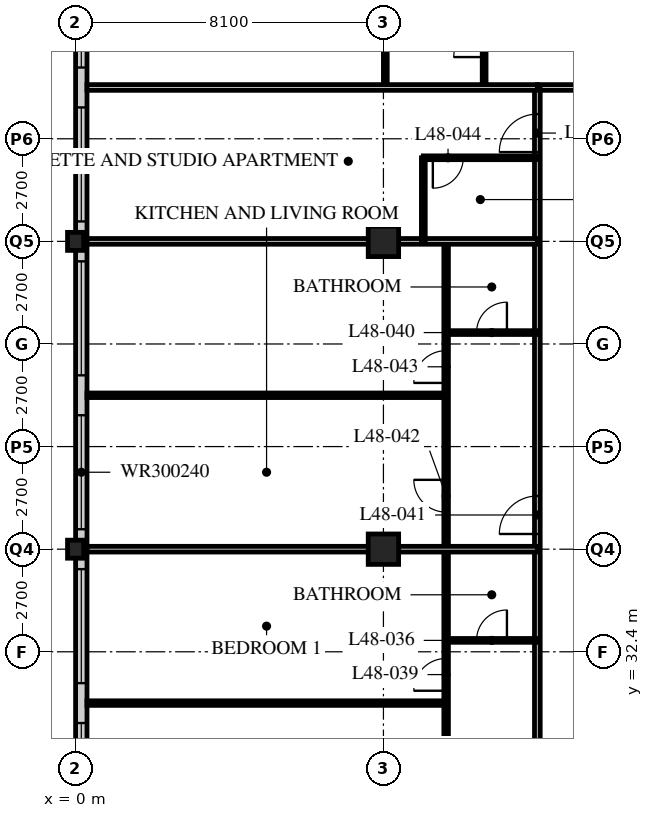
"""IFC4 building model, lengths in metres.
Left out: names, types, materials, properties, quantities, classifications, styles, units other than length and angle.
Written with IfcOpenShell. Run it as: python <this file> out.ifc"""

import sys

from ifc_helpers import new_model, si_unit, direction, frame, frame_2d, origin, origin_2d, place, context, subcontext, project, spatial, rectangle, hollow_rectangle, i_section, extrude, element, fill, save


model = new_model("IFC4")
c1 = context("Model", 3, precision=1e-05, world=origin(), true_north=direction((0.0, 1.0)))
c2 = subcontext(c1, "Body", "Model", "MODEL_VIEW")
j1 = project(units=[si_unit("LENGTHUNIT", "METRE"), si_unit("PLANEANGLEUNIT", "RADIAN")], contexts=[c1])
p1 = place(None, origin())
s1 = spatial("IfcSite", under=j1, at=p1, CompositionType="ELEMENT")
p2 = place(p1, origin())
s2 = spatial("IfcBuilding", under=s1, at=p2, CompositionType="ELEMENT")
p3 = place(p2, frame((0.0, 0.0, 188.4)))
s3 = spatial("IfcBuildingStorey", under=s2, at=p3, CompositionType="ELEMENT", Elevation=188.4)
for number, where, z_axis, x_axis in (
    (1, (0.0, 35.1, 0.0), (0.0, 0.0, 1.0), (1.0, 0.0, 0.0)),
    (2, (0.0, 43.2, 0.0), (0.0, 0.0, 1.0), (1.0, 0.0, 0.0)),
):
    element("IfcColumn", number, at=place(p3, frame(where, z_axis=z_axis, x_axis=x_axis)), inside=s3, PredefinedType="COLUMN", context=c2, shape_type="SweptSolid", body=[
        extrude(i_section(OverallWidth=0.424, OverallDepth=0.475, WebThickness=0.048, FlangeThickness=0.077, FilletRadius=0.015, at=origin_2d()), origin(), (0.0, 0.0, 1.0), 3.6),
    ])
for number, where, z_axis, x_axis in (
    (3, (8.1, 35.1, 0.0), (0.0, 0.0, 1.0), (1.0, 0.0, 0.0)),
    (4, (8.1, 43.2, 0.0), (0.0, 0.0, 1.0), (1.0, 0.0, 0.0)),
):
    element("IfcColumn", number, at=place(p3, frame(where, z_axis=z_axis, x_axis=x_axis)), inside=s3, PredefinedType="COLUMN", context=c2, shape_type="SweptSolid", body=[
        extrude(hollow_rectangle(XDim=0.8, YDim=0.8, WallThickness=0.08, at=origin_2d()), origin(), (0.0, 0.0, 1.0), 3.6),
    ])
p4 = place(p3, frame((0.15, 51.0, 0.0), z_axis=(0.0, 0.0, 1.0), x_axis=(0.0, -1.0, 0.0)))
e5 = element("IfcWall", 5, at=p4, inside=s3, PredefinedType="SOLIDWALL", context=c2, shape_type="SweptSolid", body=[
    extrude(rectangle(XDim=32.1, YDim=0.3, at=frame_2d((16.05, 0.0))), origin(), (0.0, 0.0, 1.0), 3.39),
])
p5 = place(p4, frame((0.225, 0.0, 0.6)))
e6 = element("IfcOpeningElement", 6, at=p5, cuts=e5, PredefinedType="OPENING", context=c2, shape_type="SweptSolid", body=[
    extrude(rectangle(XDim=3.0, YDim=2.4, at=frame_2d((1.5, 1.2))), frame((0.0, 0.16, 0.0), z_axis=(0.0, -1.0, 0.0), x_axis=(1.0, 0.0, 0.0)), (0.0, 0.0, 1.0), 0.32),
])
p6 = place(p4, frame((4.275, 0.0, 0.6)))
e7 = element("IfcOpeningElement", 7, at=p6, cuts=e5, PredefinedType="OPENING", context=c2, shape_type="SweptSolid", body=[
    extrude(rectangle(XDim=3.0, YDim=2.4, at=frame_2d((1.5, 1.2))), frame((0.0, 0.16, 0.0), z_axis=(0.0, -1.0, 0.0), x_axis=(1.0, 0.0, 0.0)), (0.0, 0.0, 1.0), 0.32),
])
p7 = place(p4, frame((8.325, 0.0, 0.6)))
e8 = element("IfcOpeningElement", 8, at=p7, cuts=e5, PredefinedType="OPENING", context=c2, shape_type="SweptSolid", body=[
    extrude(rectangle(XDim=3.0, YDim=2.4, at=frame_2d((1.5, 1.2))), frame((0.0, 0.16, 0.0), z_axis=(0.0, -1.0, 0.0), x_axis=(1.0, 0.0, 0.0)), (0.0, 0.0, 1.0), 0.32),
])
p8 = place(p4, frame((12.375, 0.0, 0.6)))
e9 = element("IfcOpeningElement", 9, at=p8, cuts=e5, PredefinedType="OPENING", context=c2, shape_type="SweptSolid", body=[
    extrude(rectangle(XDim=3.0, YDim=2.4, at=frame_2d((1.5, 1.2))), frame((0.0, 0.16, 0.0), z_axis=(0.0, -1.0, 0.0), x_axis=(1.0, 0.0, 0.0)), (0.0, 0.0, 1.0), 0.32),
])
p9 = place(p4, frame((16.425, 0.0, 0.6)))
e10 = element("IfcOpeningElement", 10, at=p9, cuts=e5, PredefinedType="OPENING", context=c2, shape_type="SweptSolid", body=[
    extrude(rectangle(XDim=3.0, YDim=2.4, at=frame_2d((1.5, 1.2))), frame((0.0, 0.16, 0.0), z_axis=(0.0, -1.0, 0.0), x_axis=(1.0, 0.0, 0.0)), (0.0, 0.0, 1.0), 0.32),
])
p10 = place(p4, frame((20.475, 0.0, 0.6)))
e11 = element("IfcOpeningElement", 11, at=p10, cuts=e5, PredefinedType="OPENING", context=c2, shape_type="SweptSolid", body=[
    extrude(rectangle(XDim=3.0, YDim=2.4, at=frame_2d((1.5, 1.2))), frame((0.0, 0.16, 0.0), z_axis=(0.0, -1.0, 0.0), x_axis=(1.0, 0.0, 0.0)), (0.0, 0.0, 1.0), 0.32),
])
p11 = place(p4, frame((24.525, 0.0, 0.6)))
e12 = element("IfcOpeningElement", 12, at=p11, cuts=e5, PredefinedType="OPENING", context=c2, shape_type="SweptSolid", body=[
    extrude(rectangle(XDim=3.0, YDim=2.4, at=frame_2d((1.5, 1.2))), frame((0.0, 0.16, 0.0), z_axis=(0.0, -1.0, 0.0), x_axis=(1.0, 0.0, 0.0)), (0.0, 0.0, 1.0), 0.32),
])
p12 = place(p4, frame((28.575, 0.0, 0.6)))
e13 = element("IfcOpeningElement", 13, at=p12, cuts=e5, PredefinedType="OPENING", context=c2, shape_type="SweptSolid", body=[
    extrude(rectangle(XDim=3.0, YDim=2.4, at=frame_2d((1.5, 1.2))), frame((0.0, 0.16, 0.0), z_axis=(0.0, -1.0, 0.0), x_axis=(1.0, 0.0, 0.0)), (0.0, 0.0, 1.0), 0.32),
])
p13 = place(p3, frame((12.15, 47.25, 0.0), z_axis=(0.0, 0.0, 1.0), x_axis=(1.0, 0.0, 0.0)))
e14 = element("IfcWall", 14, at=p13, inside=s3, PredefinedType="PARTITIONING", context=c2, shape_type="SweptSolid", body=[
    extrude(rectangle(XDim=32.4, YDim=0.15, at=frame_2d((16.2, 0.0))), origin(), (0.0, 0.0, 1.0), 3.39),
])
p14 = place(p13, frame((4.45, 0.0, 0.0)))
e15 = element("IfcOpeningElement", 15, at=p14, cuts=e14, PredefinedType="OPENING", context=c2, shape_type="SweptSolid", body=[
    extrude(rectangle(XDim=1.0, YDim=2.1, at=frame_2d((0.5, 1.05))), frame((0.0, 0.085, 0.0), z_axis=(0.0, -1.0, 0.0), x_axis=(1.0, 0.0, 0.0)), (0.0, 0.0, 1.0), 0.17),
])
p15 = place(p13, frame((16.6, 0.0, 0.0)))
e16 = element("IfcOpeningElement", 16, at=p15, cuts=e14, PredefinedType="OPENING", context=c2, shape_type="SweptSolid", body=[
    extrude(rectangle(XDim=1.0, YDim=2.1, at=frame_2d((0.5, 1.05))), frame((0.0, 0.085, 0.0), z_axis=(0.0, -1.0, 0.0), x_axis=(1.0, 0.0, 0.0)), (0.0, 0.0, 1.0), 0.17),
])
p16 = place(p13, frame((29.875, 0.0, 0.0)))
e17 = element("IfcOpeningElement", 17, at=p16, cuts=e14, PredefinedType="OPENING", context=c2, shape_type="SweptSolid", body=[
    extrude(rectangle(XDim=1.0, YDim=2.1, at=frame_2d((0.5, 1.05))), frame((0.0, 0.085, 0.0), z_axis=(0.0, -1.0, 0.0), x_axis=(1.0, 0.0, 0.0)), (0.0, 0.0, 1.0), 0.17),
])
p17 = place(p13, frame((1.525, 0.0, 0.0)))
e18 = element("IfcOpeningElement", 18, at=p17, cuts=e14, PredefinedType="OPENING", context=c2, shape_type="SweptSolid", body=[
    extrude(rectangle(XDim=1.0, YDim=2.1, at=frame_2d((0.5, 1.05))), frame((0.0, 0.085, 0.0), z_axis=(0.0, -1.0, 0.0), x_axis=(1.0, 0.0, 0.0)), (0.0, 0.0, 1.0), 0.17),
])
p18 = place(p3, frame((12.15, 18.9, 0.0), z_axis=(0.0, 0.0, 1.0), x_axis=(0.0, 1.0, 0.0)))
e19 = element("IfcWall", 19, at=p18, inside=s3, PredefinedType="PARTITIONING", context=c2, shape_type="SweptSolid", body=[
    extrude(rectangle(XDim=28.35, YDim=0.15, at=frame_2d((14.175, 0.0))), origin(), (0.0, 0.0, 1.0), 3.39),
])
p19 = place(p18, frame((2.35, 0.0, 0.0)))
e20 = element("IfcOpeningElement", 20, at=p19, cuts=e19, PredefinedType="OPENING", context=c2, shape_type="SweptSolid", body=[
    extrude(rectangle(XDim=1.0, YDim=2.1, at=frame_2d((0.5, 1.05))), frame((0.0, 0.085, 0.0), z_axis=(0.0, -1.0, 0.0), x_axis=(1.0, 0.0, 0.0)), (0.0, 0.0, 1.0), 0.17),
])
p20 = place(p18, frame((6.4, 0.0, 0.0)))
e21 = element("IfcOpeningElement", 21, at=p20, cuts=e19, PredefinedType="OPENING", context=c2, shape_type="SweptSolid", body=[
    extrude(rectangle(XDim=1.0, YDim=2.1, at=frame_2d((0.5, 1.05))), frame((0.0, 0.085, 0.0), z_axis=(0.0, -1.0, 0.0), x_axis=(1.0, 0.0, 0.0)), (0.0, 0.0, 1.0), 0.17),
])
p21 = place(p18, frame((8.5, 0.0, 0.0)))
e22 = element("IfcOpeningElement", 22, at=p21, cuts=e19, PredefinedType="OPENING", context=c2, shape_type="SweptSolid", body=[
    extrude(rectangle(XDim=1.0, YDim=2.1, at=frame_2d((0.5, 1.05))), frame((0.0, 0.085, 0.0), z_axis=(0.0, -1.0, 0.0), x_axis=(1.0, 0.0, 0.0)), (0.0, 0.0, 1.0), 0.17),
])
p22 = place(p18, frame((16.6, 0.0, 0.0)))
e23 = element("IfcOpeningElement", 23, at=p22, cuts=e19, PredefinedType="OPENING", context=c2, shape_type="SweptSolid", body=[
    extrude(rectangle(XDim=1.0, YDim=2.1, at=frame_2d((0.5, 1.05))), frame((0.0, 0.085, 0.0), z_axis=(0.0, -1.0, 0.0), x_axis=(1.0, 0.0, 0.0)), (0.0, 0.0, 1.0), 0.17),
])
p23 = place(p18, frame((26.65, 0.0, 0.0)))
e24 = element("IfcOpeningElement", 24, at=p23, cuts=e19, PredefinedType="OPENING", context=c2, shape_type="SweptSolid", body=[
    extrude(rectangle(XDim=1.0, YDim=2.1, at=frame_2d((0.5, 1.05))), frame((0.0, 0.085, 0.0), z_axis=(0.0, -1.0, 0.0), x_axis=(1.0, 0.0, 0.0)), (0.0, 0.0, 1.0), 0.17),
])
p24 = place(p3, frame((9.75, 27.0, 0.0), z_axis=(0.0, 0.0, 1.0), x_axis=(0.0, 1.0, 0.0)))
e25 = element("IfcWall", 25, at=p24, inside=s3, PredefinedType="PARTITIONING", context=c2, shape_type="SweptSolid", body=[
    extrude(rectangle(XDim=16.2, YDim=0.12, at=frame_2d((8.1, 0.0))), origin(), (0.0, 0.0, 1.0), 3.39),
])
p25 = place(p24, frame((0.975, 0.0, 0.0)))
e26 = element("IfcOpeningElement", 26, at=p25, cuts=e25, PredefinedType="OPENING", context=c2, shape_type="SweptSolid", body=[
    extrude(rectangle(XDim=0.85, YDim=2.1, at=frame_2d((0.425, 1.05))), frame((0.0, 0.07, 0.0), z_axis=(0.0, -1.0, 0.0), x_axis=(1.0, 0.0, 0.0)), (0.0, 0.0, 1.0), 0.14),
])
p26 = place(p24, frame((4.375, 0.0, 0.0)))
e27 = element("IfcOpeningElement", 27, at=p26, cuts=e25, PredefinedType="OPENING", context=c2, shape_type="SweptSolid", body=[
    extrude(rectangle(XDim=0.85, YDim=2.1, at=frame_2d((0.425, 1.05))), frame((0.0, 0.07, 0.0), z_axis=(0.0, -1.0, 0.0), x_axis=(1.0, 0.0, 0.0)), (0.0, 0.0, 1.0), 0.14),
])
p27 = place(p24, frame((9.075, 0.0, 0.0)))
e28 = element("IfcOpeningElement", 28, at=p27, cuts=e25, PredefinedType="OPENING", context=c2, shape_type="SweptSolid", body=[
    extrude(rectangle(XDim=0.85, YDim=2.1, at=frame_2d((0.425, 1.05))), frame((0.0, 0.07, 0.0), z_axis=(0.0, -1.0, 0.0), x_axis=(1.0, 0.0, 0.0)), (0.0, 0.0, 1.0), 0.14),
])
p28 = place(p24, frame((12.475, 0.0, 0.0)))
e29 = element("IfcOpeningElement", 29, at=p28, cuts=e25, PredefinedType="OPENING", context=c2, shape_type="SweptSolid", body=[
    extrude(rectangle(XDim=0.85, YDim=2.1, at=frame_2d((0.425, 1.05))), frame((0.0, 0.07, 0.0), z_axis=(0.0, -1.0, 0.0), x_axis=(1.0, 0.0, 0.0)), (0.0, 0.0, 1.0), 0.14),
])
p29 = place(p3, frame((12.15, 32.7, 0.0), z_axis=(0.0, 0.0, 1.0), x_axis=(-1.0, 0.0, 0.0)))
e30 = element("IfcWall", 30, at=p29, inside=s3, PredefinedType="PARTITIONING", context=c2, shape_type="SweptSolid", body=[
    extrude(rectangle(XDim=2.4, YDim=0.1, at=frame_2d((1.2, 0.0))), origin(), (0.0, 0.0, 1.0), 3.39),
])
p30 = place(p29, frame((0.8, 0.0, 0.0)))
e31 = element("IfcOpeningElement", 31, at=p30, cuts=e30, PredefinedType="OPENING", context=c2, shape_type="SweptSolid", body=[
    extrude(rectangle(XDim=0.8, YDim=2.1, at=frame_2d((0.4, 1.05))), frame((0.0, 0.06, 0.0), z_axis=(0.0, -1.0, 0.0), x_axis=(1.0, 0.0, 0.0)), (0.0, 0.0, 1.0), 0.12),
])
p31 = place(p3, frame((9.75, 31.05, 0.0), z_axis=(0.0, 0.0, 1.0), x_axis=(-1.0, 0.0, 0.0)))
e32 = element("IfcWall", 32, at=p31, inside=s3, PredefinedType="PARTITIONING", context=c2, shape_type="SweptSolid", body=[
    extrude(rectangle(XDim=9.45, YDim=0.12, at=frame_2d((4.725, 0.0))), origin(), (0.0, 0.0, 1.0), 3.39),
])
p32 = place(p3, frame((12.15, 35.1, 0.0), z_axis=(0.0, 0.0, 1.0), x_axis=(-1.0, 0.0, 0.0)))
e33 = element("IfcWall", 33, at=p32, inside=s3, PredefinedType="PARTITIONING", context=c2, shape_type="SweptSolid", body=[
    extrude(rectangle(XDim=11.85, YDim=0.15, at=frame_2d((5.925, 0.0))), origin(), (0.0, 0.0, 1.0), 2.778),
])
p33 = place(p3, frame((12.15, 40.8, 0.0), z_axis=(0.0, 0.0, 1.0), x_axis=(-1.0, 0.0, 0.0)))
e34 = element("IfcWall", 34, at=p33, inside=s3, PredefinedType="PARTITIONING", context=c2, shape_type="SweptSolid", body=[
    extrude(rectangle(XDim=2.4, YDim=0.1, at=frame_2d((1.2, 0.0))), origin(), (0.0, 0.0, 1.0), 3.39),
])
p34 = place(p33, frame((0.8, 0.0, 0.0)))
e35 = element("IfcOpeningElement", 35, at=p34, cuts=e34, PredefinedType="OPENING", context=c2, shape_type="SweptSolid", body=[
    extrude(rectangle(XDim=0.8, YDim=2.1, at=frame_2d((0.4, 1.05))), frame((0.0, 0.06, 0.0), z_axis=(0.0, -1.0, 0.0), x_axis=(1.0, 0.0, 0.0)), (0.0, 0.0, 1.0), 0.12),
])
p35 = place(p3, frame((9.75, 39.15, 0.0), z_axis=(0.0, 0.0, 1.0), x_axis=(-1.0, 0.0, 0.0)))
e36 = element("IfcWall", 36, at=p35, inside=s3, PredefinedType="PARTITIONING", context=c2, shape_type="SweptSolid", body=[
    extrude(rectangle(XDim=9.45, YDim=0.12, at=frame_2d((4.725, 0.0))), origin(), (0.0, 0.0, 1.0), 3.39),
])
p36 = place(p3, frame((12.15, 43.2, 0.0), z_axis=(0.0, 0.0, 1.0), x_axis=(-1.0, 0.0, 0.0)))
e37 = element("IfcWall", 37, at=p36, inside=s3, PredefinedType="PARTITIONING", context=c2, shape_type="SweptSolid", body=[
    extrude(rectangle(XDim=11.85, YDim=0.15, at=frame_2d((5.925, 0.0))), origin(), (0.0, 0.0, 1.0), 2.778),
])
p37 = place(p3, frame((9.15, 43.2, 0.0), z_axis=(0.0, 0.0, 1.0), x_axis=(0.0, 1.0, 0.0)))
e38 = element("IfcWall", 38, at=p37, inside=s3, PredefinedType="PARTITIONING", context=c2, shape_type="SweptSolid", body=[
    extrude(rectangle(XDim=2.2, YDim=0.1, at=frame_2d((1.1, 0.0))), origin(), (0.0, 0.0, 1.0), 3.39),
])
p38 = place(p3, frame((12.15, 45.4, 0.0), z_axis=(0.0, 0.0, 1.0), x_axis=(-1.0, 0.0, 0.0)))
e39 = element("IfcWall", 39, at=p38, inside=s3, PredefinedType="PARTITIONING", context=c2, shape_type="SweptSolid", body=[
    extrude(rectangle(XDim=3.0, YDim=0.1, at=frame_2d((1.5, 0.0))), origin(), (0.0, 0.0, 1.0), 3.39),
])
p39 = place(p38, frame((1.95, 0.0, 0.0)))
e40 = element("IfcOpeningElement", 40, at=p39, cuts=e39, PredefinedType="OPENING", context=c2, shape_type="SweptSolid", body=[
    extrude(rectangle(XDim=0.8, YDim=2.1, at=frame_2d((0.4, 1.05))), frame((0.0, 0.06, 0.0), z_axis=(0.0, -1.0, 0.0), x_axis=(1.0, 0.0, 0.0)), (0.0, 0.0, 1.0), 0.12),
])
p40 = place(p3, frame((10.75, 47.25, 0.0), z_axis=(0.0, 0.0, 1.0), x_axis=(0.0, 1.0, 0.0)))
e41 = element("IfcWall", 41, at=p40, inside=s3, PredefinedType="PARTITIONING", context=c2, shape_type="SweptSolid", body=[
    extrude(rectangle(XDim=2.4, YDim=0.1, at=frame_2d((1.2, 0.0))), origin(), (0.0, 0.0, 1.0), 3.39),
])
p41 = place(p40, frame((0.8, 0.0, 0.0)))
e42 = element("IfcOpeningElement", 42, at=p41, cuts=e41, PredefinedType="OPENING", context=c2, shape_type="SweptSolid", body=[
    extrude(rectangle(XDim=0.8, YDim=2.1, at=frame_2d((0.4, 1.05))), frame((0.0, 0.06, 0.0), z_axis=(0.0, -1.0, 0.0), x_axis=(1.0, 0.0, 0.0)), (0.0, 0.0, 1.0), 0.12),
])
p42 = place(p3, frame((8.15, 47.25, 0.0), z_axis=(0.0, 0.0, 1.0), x_axis=(0.0, 1.0, 0.0)))
e43 = element("IfcWall", 43, at=p42, inside=s3, PredefinedType="PARTITIONING", context=c2, shape_type="SweptSolid", body=[
    extrude(rectangle(XDim=2.4, YDim=0.1, at=frame_2d((1.2, 0.0))), origin(), (0.0, 0.0, 1.0), 2.778),
])
p43 = place(p3, frame((0.3, 47.25, 0.0), z_axis=(0.0, 0.0, 1.0), x_axis=(1.0, 0.0, 0.0)))
e44 = element("IfcWall", 44, at=p43, inside=s3, PredefinedType="PARTITIONING", context=c2, shape_type="SweptSolid", body=[
    extrude(rectangle(XDim=11.85, YDim=0.15, at=frame_2d((5.925, 0.0))), origin(), (0.0, 0.0, 1.0), 3.39),
])
p44 = place(p5, origin())
e45 = element("IfcWindow", 45, at=p44, inside=s3, PartitioningType="SINGLE_PANEL", PredefinedType="WINDOW", context=c2, shape_type="SweptSolid", body=[
    extrude(rectangle(XDim=3.0, YDim=2.4, at=frame_2d((1.5, 1.2))), frame((0.0, 0.03, 0.0), z_axis=(0.0, -1.0, 0.0), x_axis=(1.0, 0.0, 0.0)), (0.0, 0.0, 1.0), 0.06),
])
fill(e6, e45)
p45 = place(p6, origin())
e46 = element("IfcWindow", 46, at=p45, inside=s3, PartitioningType="SINGLE_PANEL", PredefinedType="WINDOW", context=c2, shape_type="SweptSolid", body=[
    extrude(rectangle(XDim=3.0, YDim=2.4, at=frame_2d((1.5, 1.2))), frame((0.0, 0.03, 0.0), z_axis=(0.0, -1.0, 0.0), x_axis=(1.0, 0.0, 0.0)), (0.0, 0.0, 1.0), 0.06),
])
fill(e7, e46)
p46 = place(p7, origin())
e47 = element("IfcWindow", 47, at=p46, inside=s3, PartitioningType="SINGLE_PANEL", PredefinedType="WINDOW", context=c2, shape_type="SweptSolid", body=[
    extrude(rectangle(XDim=3.0, YDim=2.4, at=frame_2d((1.5, 1.2))), frame((0.0, 0.03, 0.0), z_axis=(0.0, -1.0, 0.0), x_axis=(1.0, 0.0, 0.0)), (0.0, 0.0, 1.0), 0.06),
])
fill(e8, e47)
p47 = place(p8, origin())
e48 = element("IfcWindow", 48, at=p47, inside=s3, PartitioningType="SINGLE_PANEL", PredefinedType="WINDOW", context=c2, shape_type="SweptSolid", body=[
    extrude(rectangle(XDim=3.0, YDim=2.4, at=frame_2d((1.5, 1.2))), frame((0.0, 0.03, 0.0), z_axis=(0.0, -1.0, 0.0), x_axis=(1.0, 0.0, 0.0)), (0.0, 0.0, 1.0), 0.06),
])
fill(e9, e48)
p48 = place(p9, origin())
e49 = element("IfcWindow", 49, at=p48, inside=s3, PartitioningType="SINGLE_PANEL", PredefinedType="WINDOW", context=c2, shape_type="SweptSolid", body=[
    extrude(rectangle(XDim=3.0, YDim=2.4, at=frame_2d((1.5, 1.2))), frame((0.0, 0.03, 0.0), z_axis=(0.0, -1.0, 0.0), x_axis=(1.0, 0.0, 0.0)), (0.0, 0.0, 1.0), 0.06),
])
fill(e10, e49)
p49 = place(p10, origin())
e50 = element("IfcWindow", 50, at=p49, inside=s3, PartitioningType="SINGLE_PANEL", PredefinedType="WINDOW", context=c2, shape_type="SweptSolid", body=[
    extrude(rectangle(XDim=3.0, YDim=2.4, at=frame_2d((1.5, 1.2))), frame((0.0, 0.03, 0.0), z_axis=(0.0, -1.0, 0.0), x_axis=(1.0, 0.0, 0.0)), (0.0, 0.0, 1.0), 0.06),
])
fill(e11, e50)
p50 = place(p30, origin())
e51 = element("IfcDoor", 51, at=p50, inside=s3, OperationType="SINGLE_SWING_RIGHT", PredefinedType="DOOR", context=c2, shape_type="SweptSolid", body=[
    extrude(rectangle(XDim=0.8, YDim=2.1, at=frame_2d((0.4, 1.05))), frame((0.0, 0.025, 0.0), z_axis=(0.0, -1.0, 0.0), x_axis=(1.0, 0.0, 0.0)), (0.0, 0.0, 1.0), 0.05),
])
fill(e31, e51)
p51 = place(p26, origin())
e52 = element("IfcDoor", 52, at=p51, inside=s3, OperationType="SINGLE_SWING_LEFT", PredefinedType="DOOR", context=c2, shape_type="SweptSolid", body=[
    extrude(rectangle(XDim=0.85, YDim=2.1, at=frame_2d((0.425, 1.05))), frame((0.0, 0.025, 0.0), z_axis=(0.0, -1.0, 0.0), x_axis=(1.0, 0.0, 0.0)), (0.0, 0.0, 1.0), 0.05),
])
fill(e27, e52)
p52 = place(p34, origin())
e53 = element("IfcDoor", 53, at=p52, inside=s3, OperationType="SINGLE_SWING_RIGHT", PredefinedType="DOOR", context=c2, shape_type="SweptSolid", body=[
    extrude(rectangle(XDim=0.8, YDim=2.1, at=frame_2d((0.4, 1.05))), frame((0.0, 0.025, 0.0), z_axis=(0.0, -1.0, 0.0), x_axis=(1.0, 0.0, 0.0)), (0.0, 0.0, 1.0), 0.05),
])
fill(e35, e53)
p53 = place(p22, origin())
e54 = element("IfcDoor", 54, at=p53, inside=s3, OperationType="SINGLE_SWING_LEFT", PredefinedType="DOOR", context=c2, shape_type="SweptSolid", body=[
    extrude(rectangle(XDim=1.0, YDim=2.1, at=frame_2d((0.5, 1.05))), frame((0.0, 0.025, 0.0), z_axis=(0.0, -1.0, 0.0), x_axis=(1.0, 0.0, 0.0)), (0.0, 0.0, 1.0), 0.05),
])
fill(e23, e54)
p54 = place(p27, origin())
e55 = element("IfcDoor", 55, at=p54, inside=s3, OperationType="SINGLE_SWING_RIGHT", PredefinedType="DOOR", context=c2, shape_type="SweptSolid", body=[
    extrude(rectangle(XDim=0.85, YDim=2.1, at=frame_2d((0.425, 1.05))), frame((0.0, 0.025, 0.0), z_axis=(0.0, -1.0, 0.0), x_axis=(1.0, 0.0, 0.0)), (0.0, 0.0, 1.0), 0.05),
])
fill(e28, e55)
p55 = place(p28, origin())
e56 = element("IfcDoor", 56, at=p55, inside=s3, OperationType="SINGLE_SWING_LEFT", PredefinedType="DOOR", context=c2, shape_type="SweptSolid", body=[
    extrude(rectangle(XDim=0.85, YDim=2.1, at=frame_2d((0.425, 1.05))), frame((0.0, 0.025, 0.0), z_axis=(0.0, -1.0, 0.0), x_axis=(1.0, 0.0, 0.0)), (0.0, 0.0, 1.0), 0.05),
])
fill(e29, e56)
p56 = place(p39, origin())
e57 = element("IfcDoor", 57, at=p56, inside=s3, OperationType="SINGLE_SWING_RIGHT", PredefinedType="DOOR", context=c2, shape_type="SweptSolid", body=[
    extrude(rectangle(XDim=0.8, YDim=2.1, at=frame_2d((0.4, 1.05))), frame((0.0, 0.025, 0.0), z_axis=(0.0, -1.0, 0.0), x_axis=(1.0, 0.0, 0.0)), (0.0, 0.0, 1.0), 0.05),
])
fill(e40, e57)
p57 = place(p23, origin())
e58 = element("IfcDoor", 58, at=p57, inside=s3, OperationType="SINGLE_SWING_LEFT", PredefinedType="DOOR", context=c2, shape_type="SweptSolid", body=[
    extrude(rectangle(XDim=1.0, YDim=2.1, at=frame_2d((0.5, 1.05))), frame((0.0, 0.025, 0.0), z_axis=(0.0, -1.0, 0.0), x_axis=(1.0, 0.0, 0.0)), (0.0, 0.0, 1.0), 0.05),
])
fill(e24, e58)
p58 = place(p41, origin())
e59 = element("IfcDoor", 59, at=p58, inside=s3, OperationType="SINGLE_SWING_LEFT", PredefinedType="DOOR", context=c2, shape_type="SweptSolid", body=[
    extrude(rectangle(XDim=0.8, YDim=2.1, at=frame_2d((0.4, 1.05))), frame((0.0, 0.025, 0.0), z_axis=(0.0, -1.0, 0.0), x_axis=(1.0, 0.0, 0.0)), (0.0, 0.0, 1.0), 0.05),
])
fill(e42, e59)
save(model, sys.argv[1])
